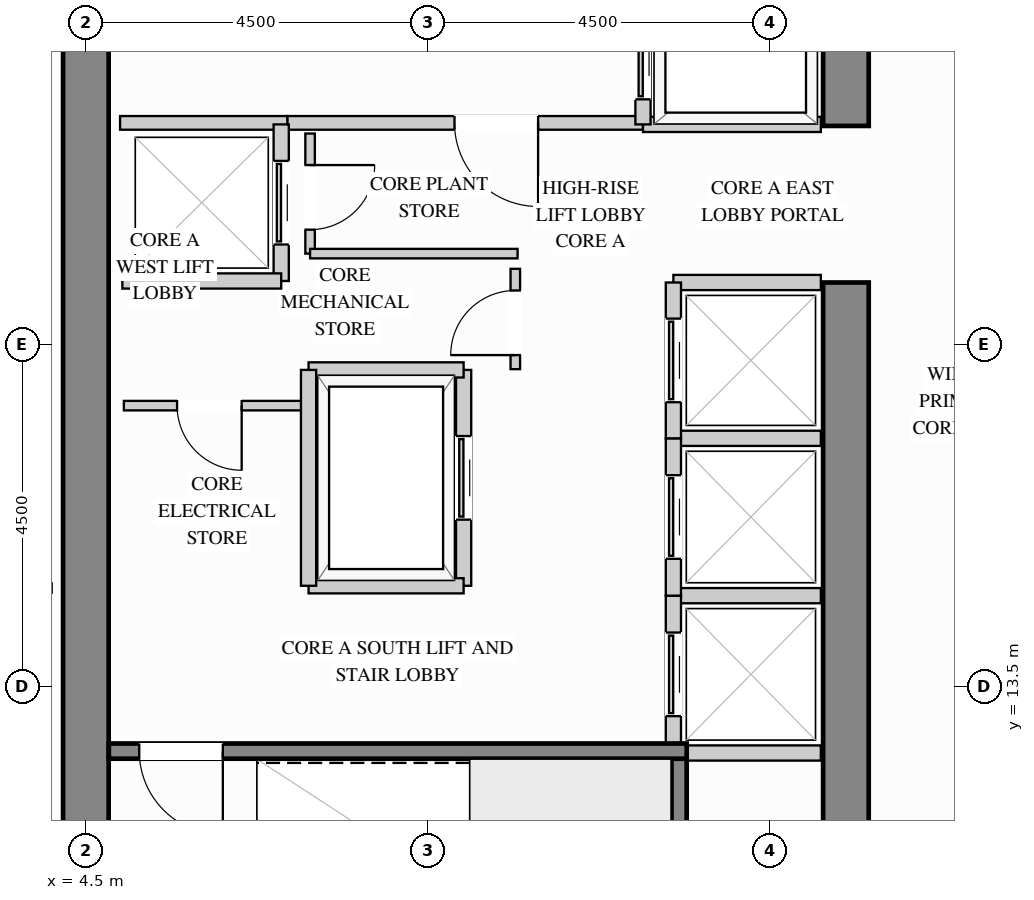
"""IFC4 building model, lengths in metres.
Left out: names, types, materials, properties, quantities, classifications, styles, units other than length and angle.
Written with IfcOpenShell. Run it as: python <this file> out.ifc"""

import sys

from ifc_helpers import new_model, si_unit, direction, frame, frame_2d, origin, place, context, subcontext, project, spatial, rectangle, extrude, source, transform, mapped, element, fill, save


model = new_model("IFC4")
c1 = context("Model", 3, precision=1e-05, world=origin(), true_north=direction((0.0, 1.0)))
c2 = subcontext(c1, "Body", "Model", "MODEL_VIEW")
j1 = project(units=[si_unit("LENGTHUNIT", "METRE"), si_unit("PLANEANGLEUNIT", "RADIAN")], contexts=[c1])
p1 = place(None, origin())
s1 = spatial("IfcSite", under=j1, at=p1, CompositionType="ELEMENT")
p2 = place(p1, origin())
s2 = spatial("IfcBuilding", under=s1, at=p2, CompositionType="ELEMENT")
p3 = place(p2, frame((0.0, 0.0, 175.5)))
s3 = spatial("IfcBuildingStorey", under=s2, at=p3, CompositionType="ELEMENT", Elevation=175.5)
m1 = source(origin(), c2, "Body", "SweptSolid", [
    extrude(rectangle(XDim=10.02, YDim=0.6, at=frame_2d((5.01, 0.0))), origin(), (0.0, 0.0, 1.0), 3.4),
])
p4 = place(p3, frame((14.5, 8.8, 0.0), z_axis=(0.0, 0.0, 1.0), x_axis=(0.0, 1.0, 0.0)))
e1 = element("IfcWall", 1, at=p4, inside=s3, PredefinedType="SHEAR", context=c2, shape_type="MappedRepresentation", body=[
    mapped(m1, transform((0.0, 0.0, 0.0), x_axis=(1.0, 0.0, 0.0), y_axis=(0.0, 1.0, 0.0), z_axis=(0.0, 0.0, 1.0))),
])
m2 = source(origin(), c2, "Body", "SweptSolid", [
    extrude(rectangle(XDim=8.32, YDim=0.6, at=frame_2d((4.16, 0.0))), origin(), (0.0, 0.0, 1.0), 3.4),
])
p5 = place(p3, frame((14.5, 20.88, 0.0), z_axis=(0.0, 0.0, 1.0), x_axis=(0.0, 1.0, 0.0)))
e2 = element("IfcWall", 2, at=p5, inside=s3, PredefinedType="SHEAR", context=c2, shape_type="MappedRepresentation", body=[
    mapped(m2, transform((0.0, 0.0, 0.0), x_axis=(1.0, 0.0, 0.0), y_axis=(0.0, 1.0, 0.0), z_axis=(0.0, 0.0, 1.0))),
])
m3 = source(origin(), c2, "Body", "SweptSolid", [
    extrude(rectangle(XDim=20.4, YDim=0.6, at=frame_2d((10.2, 0.0))), origin(), (0.0, 0.0, 1.0), 3.4),
])
p6 = place(p3, frame((4.5, 8.8, 0.0), z_axis=(0.0, 0.0, 1.0), x_axis=(0.0, 1.0, 0.0)))
e3 = element("IfcWall", 3, at=p6, inside=s3, PredefinedType="SHEAR", context=c2, shape_type="MappedRepresentation", body=[
    mapped(m3, transform((0.0, 0.0, 0.0), x_axis=(1.0, 0.0, 0.0), y_axis=(0.0, 1.0, 0.0), z_axis=(0.0, 0.0, 1.0))),
])
p7 = place(p3, frame((7.15, 20.92, 0.0), z_axis=(0.0, 0.0, 1.0), x_axis=(1.0, 0.0, 0.0)))
e4 = element("IfcWall", 4, at=p7, inside=s3, PredefinedType="PARTITIONING", context=c2, shape_type="SweptSolid", body=[
    extrude(rectangle(XDim=4.68, YDim=0.18, at=frame_2d((2.34, 0.0))), origin(), (0.0, 0.0, 1.0), 3.385),
])
p8 = place(p7, frame((2.2, 0.0, 0.0)))
e5 = element("IfcOpeningElement", 5, at=p8, cuts=e4, PredefinedType="OPENING", context=c2, shape_type="SweptSolid", body=[
    extrude(rectangle(XDim=1.1, YDim=2.15, at=frame_2d((0.55, 1.075))), frame((0.0, 0.1, 0.0), z_axis=(0.0, -1.0, 0.0), x_axis=(1.0, 0.0, 0.0)), (0.0, 0.0, 1.0), 0.2),
])
m4 = source(origin(), c2, "Body", "SweptSolid", [
    extrude(rectangle(XDim=2.2, YDim=0.18, at=frame_2d((1.1, 0.0))), origin(), (0.0, 0.0, 1.0), 3.385),
])
p9 = place(p3, frame((4.95, 20.92, 0.0), z_axis=(0.0, 0.0, 1.0), x_axis=(1.0, 0.0, 0.0)))
e6 = element("IfcWall", 6, at=p9, inside=s3, PredefinedType="PARTITIONING", context=c2, shape_type="MappedRepresentation", body=[
    mapped(m4, transform((0.0, 0.0, 0.0), x_axis=(1.0, 0.0, 0.0), y_axis=(0.0, 1.0, 0.0), z_axis=(0.0, 0.0, 1.0))),
])
p10 = place(p3, frame((10.15, 17.68, 0.0), z_axis=(0.0, 0.0, 1.0), x_axis=(0.0, 1.0, 0.0)))
e7 = element("IfcWall", 7, at=p10, inside=s3, PredefinedType="PARTITIONING", context=c2, shape_type="SweptSolid", body=[
    extrude(rectangle(XDim=1.32, YDim=0.125, at=frame_2d((0.66, 0.0))), origin(), (0.0, 0.0, 1.0), 3.385),
])
p11 = place(p10, frame((0.185, 0.0, 0.0)))
e8 = element("IfcOpeningElement", 8, at=p11, cuts=e7, PredefinedType="OPENING", context=c2, shape_type="SweptSolid", body=[
    extrude(rectangle(XDim=0.85, YDim=2.1, at=frame_2d((0.425, 1.05))), frame((0.0, 0.073, 0.0), z_axis=(0.0, -1.0, 0.0), x_axis=(1.0, 0.0, 0.0)), (0.0, 0.0, 1.0), 0.145),
])
p12 = place(p3, frame((7.45, 19.2, 0.0), z_axis=(0.0, 0.0, 1.0), x_axis=(0.0, 1.0, 0.0)))
e9 = element("IfcWall", 9, at=p12, inside=s3, PredefinedType="PARTITIONING", context=c2, shape_type="SweptSolid", body=[
    extrude(rectangle(XDim=1.58, YDim=0.125, at=frame_2d((0.79, 0.0))), origin(), (0.0, 0.0, 1.0), 3.385),
])
p13 = place(p12, frame((0.315, 0.0, 0.0)))
e10 = element("IfcOpeningElement", 10, at=p13, cuts=e9, PredefinedType="OPENING", context=c2, shape_type="SweptSolid", body=[
    extrude(rectangle(XDim=0.85, YDim=2.1, at=frame_2d((0.425, 1.05))), frame((0.0, 0.073, 0.0), z_axis=(0.0, -1.0, 0.0), x_axis=(1.0, 0.0, 0.0)), (0.0, 0.0, 1.0), 0.145),
])
m5 = source(origin(), c2, "Body", "SweptSolid", [
    extrude(rectangle(XDim=2.73, YDim=0.125, at=frame_2d((1.365, 0.0))), origin(), (0.0, 0.0, 1.0), 3.385),
])
p14 = place(p3, frame((7.45, 19.2, 0.0), z_axis=(0.0, 0.0, 1.0), x_axis=(1.0, 0.0, 0.0)))
e11 = element("IfcWall", 11, at=p14, inside=s3, PredefinedType="PARTITIONING", context=c2, shape_type="MappedRepresentation", body=[
    mapped(m5, transform((0.0, 0.0, 0.0), x_axis=(1.0, 0.0, 0.0), y_axis=(0.0, 1.0, 0.0), z_axis=(0.0, 0.0, 1.0))),
])
p15 = place(p3, frame((5.0, 17.2, 0.0), z_axis=(0.0, 0.0, 1.0), x_axis=(1.0, 0.0, 0.0)))
e12 = element("IfcWall", 12, at=p15, inside=s3, PredefinedType="PARTITIONING", context=c2, shape_type="SweptSolid", body=[
    extrude(rectangle(XDim=2.4, YDim=0.125, at=frame_2d((1.2, 0.0))), origin(), (0.0, 0.0, 1.0), 3.385),
])
p16 = place(p15, frame((0.7, 0.0, 0.0)))
e13 = element("IfcOpeningElement", 13, at=p16, cuts=e12, PredefinedType="OPENING", context=c2, shape_type="SweptSolid", body=[
    extrude(rectangle(XDim=0.85, YDim=2.1, at=frame_2d((0.425, 1.05))), frame((0.0, 0.073, 0.0), z_axis=(0.0, -1.0, 0.0), x_axis=(1.0, 0.0, 0.0)), (0.0, 0.0, 1.0), 0.145),
])
m6 = source(origin(), c2, "Body", "SweptSolid", [
    extrude(rectangle(XDim=3.698, YDim=0.125, at=frame_2d((1.849, 0.0))), origin(), (0.0, 0.0, 1.0), 3.385),
])
p17 = place(p3, frame((0.352, 14.8, 0.0), z_axis=(0.0, 0.0, 1.0), x_axis=(1.0, 0.0, 0.0)))
e14 = element("IfcWall", 14, at=p17, inside=s3, PredefinedType="PARTITIONING", context=c2, shape_type="MappedRepresentation", body=[
    mapped(m6, transform((0.0, 0.0, 0.0), x_axis=(1.0, 0.0, 0.0), y_axis=(0.0, 1.0, 0.0), z_axis=(0.0, 0.0, 1.0))),
])
m7 = source(origin(), c2, "Body", "SweptSolid", [
    extrude(rectangle(XDim=2.34, YDim=0.2, at=frame_2d((1.17, 0.0))), origin(), (0.0, 0.0, 1.0), 3.385),
])
p18 = place(p3, frame((11.83, 20.9, 0.0), z_axis=(0.0, 0.0, 1.0), x_axis=(1.0, 0.0, 0.0)))
e15 = element("IfcWall", 15, at=p18, inside=s3, PredefinedType="PARTITIONING", context=c2, shape_type="MappedRepresentation", body=[
    mapped(m7, transform((0.0, 0.0, 0.0), x_axis=(1.0, 0.0, 0.0), y_axis=(0.0, 1.0, 0.0), z_axis=(0.0, 0.0, 1.0))),
])
p19 = place(p3, frame((11.83, 20.9, 0.0), z_axis=(0.0, 0.0, 1.0), x_axis=(0.0, 1.0, 0.0)))
e16 = element("IfcWall", 16, at=p19, inside=s3, PredefinedType="PARTITIONING", context=c2, shape_type="SweptSolid", body=[
    extrude(rectangle(XDim=1.76, YDim=0.2, at=frame_2d((0.88, 0.0))), origin(), (0.0, 0.0, 1.0), 3.385),
])
p20 = place(p19, frame((0.33, 0.0, 0.0)))
e17 = element("IfcOpeningElement", 17, at=p20, cuts=e16, PredefinedType="OPENING", context=c2, shape_type="SweptSolid", body=[
    extrude(rectangle(XDim=1.1, YDim=2.2, at=frame_2d((0.55, 1.1))), frame((0.0, 0.11, 0.0), z_axis=(0.0, -1.0, 0.0), x_axis=(1.0, 0.0, 0.0)), (0.0, 0.0, 1.0), 0.22),
])
m8 = source(origin(), c2, "Body", "SweptSolid", [
    extrude(rectangle(XDim=1.94, YDim=0.2, at=frame_2d((0.97, 0.0))), origin(), (0.0, 0.0, 1.0), 3.385),
])
for number, where, z_axis, x_axis in (
    (18, (12.23, 14.7, 0.0), (0.0, 0.0, 1.0), (1.0, 0.0, 0.0)),
    (19, (12.23, 12.63, 0.0), (0.0, 0.0, 1.0), (1.0, 0.0, 0.0)),
):
    element("IfcWall", number, at=place(p3, frame(where, z_axis=z_axis, x_axis=x_axis)), inside=s3, PredefinedType="PARTITIONING", context=c2, shape_type="MappedRepresentation", body=[
        mapped(m8, transform((0.0, 0.0, 0.0), x_axis=(1.0, 0.0, 0.0), y_axis=(0.0, 1.0, 0.0), z_axis=(0.0, 0.0, 1.0))),
    ])
p21 = place(p3, frame((12.23, 12.63, 0.0), z_axis=(0.0, 0.0, 1.0), x_axis=(0.0, 1.0, 0.0)))
e20 = element("IfcWall", 20, at=p21, inside=s3, PredefinedType="PARTITIONING", context=c2, shape_type="SweptSolid", body=[
    extrude(rectangle(XDim=2.07, YDim=0.2, at=frame_2d((1.035, 0.0))), origin(), (0.0, 0.0, 1.0), 3.385),
])
p22 = place(p21, frame((0.485, 0.0, 0.0)))
e21 = element("IfcOpeningElement", 21, at=p22, cuts=e20, PredefinedType="OPENING", context=c2, shape_type="SweptSolid", body=[
    extrude(rectangle(XDim=1.1, YDim=2.2, at=frame_2d((0.55, 1.1))), frame((0.0, 0.11, 0.0), z_axis=(0.0, -1.0, 0.0), x_axis=(1.0, 0.0, 0.0)), (0.0, 0.0, 1.0), 0.22),
])
p23 = place(p3, frame((12.23, 16.77, 0.0), z_axis=(0.0, 0.0, 1.0), x_axis=(1.0, 0.0, 0.0)))
e22 = element("IfcWall", 22, at=p23, inside=s3, PredefinedType="PARTITIONING", context=c2, shape_type="MappedRepresentation", body=[
    mapped(m8, transform((0.0, 0.0, 0.0), x_axis=(1.0, 0.0, 0.0), y_axis=(0.0, 1.0, 0.0), z_axis=(0.0, 0.0, 1.0))),
])
p24 = place(p3, frame((12.23, 14.7, 0.0), z_axis=(0.0, 0.0, 1.0), x_axis=(0.0, 1.0, 0.0)))
e23 = element("IfcWall", 23, at=p24, inside=s3, PredefinedType="PARTITIONING", context=c2, shape_type="SweptSolid", body=[
    extrude(rectangle(XDim=2.07, YDim=0.2, at=frame_2d((1.035, 0.0))), origin(), (0.0, 0.0, 1.0), 3.385),
])
p25 = place(p24, frame((0.485, 0.0, 0.0)))
e24 = element("IfcOpeningElement", 24, at=p25, cuts=e23, PredefinedType="OPENING", context=c2, shape_type="SweptSolid", body=[
    extrude(rectangle(XDim=1.1, YDim=2.2, at=frame_2d((0.55, 1.1))), frame((0.0, 0.11, 0.0), z_axis=(0.0, -1.0, 0.0), x_axis=(1.0, 0.0, 0.0)), (0.0, 0.0, 1.0), 0.22),
])
p26 = place(p3, frame((12.23, 18.82, 0.0), z_axis=(0.0, 0.0, 1.0), x_axis=(1.0, 0.0, 0.0)))
e25 = element("IfcWall", 25, at=p26, inside=s3, PredefinedType="PARTITIONING", context=c2, shape_type="MappedRepresentation", body=[
    mapped(m8, transform((0.0, 0.0, 0.0), x_axis=(1.0, 0.0, 0.0), y_axis=(0.0, 1.0, 0.0), z_axis=(0.0, 0.0, 1.0))),
])
p27 = place(p3, frame((12.23, 16.77, 0.0), z_axis=(0.0, 0.0, 1.0), x_axis=(0.0, 1.0, 0.0)))
e26 = element("IfcWall", 26, at=p27, inside=s3, PredefinedType="PARTITIONING", context=c2, shape_type="SweptSolid", body=[
    extrude(rectangle(XDim=2.05, YDim=0.2, at=frame_2d((1.025, 0.0))), origin(), (0.0, 0.0, 1.0), 3.385),
])
p28 = place(p27, frame((0.475, 0.0, 0.0)))
e27 = element("IfcOpeningElement", 27, at=p28, cuts=e26, PredefinedType="OPENING", context=c2, shape_type="SweptSolid", body=[
    extrude(rectangle(XDim=1.1, YDim=2.2, at=frame_2d((0.55, 1.1))), frame((0.0, 0.11, 0.0), z_axis=(0.0, -1.0, 0.0), x_axis=(1.0, 0.0, 0.0)), (0.0, 0.0, 1.0), 0.22),
])
p29 = place(p3, frame((7.07, 18.84, 0.0), z_axis=(0.0, 0.0, 1.0), x_axis=(0.0, 1.0, 0.0)))
e28 = element("IfcWall", 28, at=p29, inside=s3, PredefinedType="PARTITIONING", context=c2, shape_type="SweptSolid", body=[
    extrude(rectangle(XDim=2.06, YDim=0.2, at=frame_2d((1.03, 0.0))), origin(), (0.0, 0.0, 1.0), 3.385),
])
p30 = place(p29, frame((0.48, 0.0, 0.0)))
e29 = element("IfcOpeningElement", 29, at=p30, cuts=e28, PredefinedType="OPENING", context=c2, shape_type="SweptSolid", body=[
    extrude(rectangle(XDim=1.1, YDim=2.2, at=frame_2d((0.55, 1.1))), frame((0.0, 0.11, 0.0), z_axis=(0.0, -1.0, 0.0), x_axis=(1.0, 0.0, 0.0)), (0.0, 0.0, 1.0), 0.22),
])
m9 = source(origin(), c2, "Body", "SweptSolid", [
    extrude(rectangle(XDim=2.09, YDim=0.2, at=frame_2d((1.045, 0.0))), origin(), (0.0, 0.0, 1.0), 3.385),
])
p31 = place(p3, frame((4.98, 18.84, 0.0), z_axis=(0.0, 0.0, 1.0), x_axis=(1.0, 0.0, 0.0)))
e30 = element("IfcWall", 30, at=p31, inside=s3, PredefinedType="PARTITIONING", context=c2, shape_type="MappedRepresentation", body=[
    mapped(m9, transform((0.0, 0.0, 0.0), x_axis=(1.0, 0.0, 0.0), y_axis=(0.0, 1.0, 0.0), z_axis=(0.0, 0.0, 1.0))),
])
p32 = place(p3, frame((9.47, 14.83, 0.0), z_axis=(0.0, 0.0, 1.0), x_axis=(0.0, 1.0, 0.0)))
e31 = element("IfcWall", 31, at=p32, inside=s3, PredefinedType="PARTITIONING", context=c2, shape_type="SweptSolid", body=[
    extrude(rectangle(XDim=2.84, YDim=0.2, at=frame_2d((1.42, 0.0))), origin(), (0.0, 0.0, 1.0), 3.385),
])
p33 = place(p32, frame((0.87, 0.0, 0.0)))
e32 = element("IfcOpeningElement", 32, at=p33, cuts=e31, PredefinedType="OPENING", context=c2, shape_type="SweptSolid", body=[
    extrude(rectangle(XDim=1.1, YDim=2.2, at=frame_2d((0.55, 1.1))), frame((0.0, 0.11, 0.0), z_axis=(0.0, -1.0, 0.0), x_axis=(1.0, 0.0, 0.0)), (0.0, 0.0, 1.0), 0.22),
])
m10 = source(origin(), c2, "Body", "SweptSolid", [
    extrude(rectangle(XDim=2.04, YDim=0.2, at=frame_2d((1.02, 0.0))), origin(), (0.0, 0.0, 1.0), 3.385),
])
for number, where, z_axis, x_axis in (
    (33, (7.43, 17.67, 0.0), (0.0, 0.0, 1.0), (1.0, 0.0, 0.0)),
    (34, (7.43, 14.83, 0.0), (0.0, 0.0, 1.0), (1.0, 0.0, 0.0)),
):
    element("IfcWall", number, at=place(p3, frame(where, z_axis=z_axis, x_axis=x_axis)), inside=s3, PredefinedType="PARTITIONING", context=c2, shape_type="MappedRepresentation", body=[
        mapped(m10, transform((0.0, 0.0, 0.0), x_axis=(1.0, 0.0, 0.0), y_axis=(0.0, 1.0, 0.0), z_axis=(0.0, 0.0, 1.0))),
    ])
m11 = source(origin(), c2, "Body", "SweptSolid", [
    extrude(rectangle(XDim=2.84, YDim=0.2, at=frame_2d((1.42, 0.0))), origin(), (0.0, 0.0, 1.0), 3.385),
])
p34 = place(p3, frame((7.43, 14.83, 0.0), z_axis=(0.0, 0.0, 1.0), x_axis=(0.0, 1.0, 0.0)))
e35 = element("IfcWall", 35, at=p34, inside=s3, PredefinedType="PARTITIONING", context=c2, shape_type="MappedRepresentation", body=[
    mapped(m11, transform((0.0, 0.0, 0.0), x_axis=(1.0, 0.0, 0.0), y_axis=(0.0, 1.0, 0.0), z_axis=(0.0, 0.0, 1.0))),
])
m12 = source(origin(), c2, "Body", "SweptSolid", [
    extrude(rectangle(XDim=3.753, YDim=0.2, at=frame_2d((1.876, 0.0))), origin(), (0.0, 0.0, 1.0), 3.4),
])
p35 = place(p3, frame((12.305, 8.802, 0.0), z_axis=(0.0, 0.0, 1.0), x_axis=(0.0, 1.0, 0.0)))
e36 = element("IfcWall", 36, at=p35, inside=s3, PredefinedType="SHEAR", context=c2, shape_type="MappedRepresentation", body=[
    mapped(m12, transform((0.0, 0.0, 0.0), x_axis=(1.0, 0.0, 0.0), y_axis=(0.0, 1.0, 0.0), z_axis=(0.0, 0.0, 1.0))),
])
p36 = place(p3, frame((4.802, 12.655, 0.0), z_axis=(0.0, 0.0, 1.0), x_axis=(1.0, 0.0, 0.0)))
e37 = element("IfcWall", 37, at=p36, inside=s3, PredefinedType="SHEAR", context=c2, shape_type="SweptSolid", body=[
    extrude(rectangle(XDim=7.603, YDim=0.2, at=frame_2d((3.802, 0.0))), origin(), (0.0, 0.0, 1.0), 3.4),
])
p37 = place(p36, frame((0.4, 0.0, 0.0)))
e38 = element("IfcOpeningElement", 38, at=p37, cuts=e37, PredefinedType="OPENING", context=c2, shape_type="SweptSolid", body=[
    extrude(rectangle(XDim=1.1, YDim=2.15, at=frame_2d((0.55, 1.075))), frame((0.0, 0.11, 0.0), z_axis=(0.0, -1.0, 0.0), x_axis=(1.0, 0.0, 0.0)), (0.0, 0.0, 1.0), 0.22),
])
m13 = source(origin(), c2, "Body", "SweptSolid", [
    extrude(rectangle(XDim=1.1, YDim=2.15, at=frame_2d((0.55, 1.075))), frame((0.0, 0.025, 0.0), z_axis=(0.0, -1.0, 0.0), x_axis=(1.0, 0.0, 0.0)), (0.0, 0.0, 1.0), 0.05),
])
p38 = place(p8, origin())
e39 = element("IfcDoor", 39, at=p38, inside=s3, OperationType="SINGLE_SWING_RIGHT", PredefinedType="DOOR", context=c2, shape_type="MappedRepresentation", body=[
    mapped(m13, transform((0.0, 0.0, 0.0), x_axis=(1.0, 0.0, 0.0), y_axis=(0.0, 1.0, 0.0), z_axis=(0.0, 0.0, 1.0))),
])
fill(e5, e39)
m14 = source(origin(), c2, "Body", "SweptSolid", [
    extrude(rectangle(XDim=1.1, YDim=2.2, at=frame_2d((0.55, 1.1))), frame((0.0, 0.025, 0.0), z_axis=(0.0, -1.0, 0.0), x_axis=(1.0, 0.0, 0.0)), (0.0, 0.0, 1.0), 0.05),
])
p39 = place(p20, origin())
e40 = element("IfcDoor", 40, at=p39, inside=s3, OperationType="SLIDING_TO_LEFT", PredefinedType="DOOR", context=c2, shape_type="MappedRepresentation", body=[
    mapped(m14, transform((0.0, 0.0, 0.0), x_axis=(1.0, 0.0, 0.0), y_axis=(0.0, 1.0, 0.0), z_axis=(0.0, 0.0, 1.0))),
])
fill(e17, e40)
p40 = place(p22, origin())
e41 = element("IfcDoor", 41, at=p40, inside=s3, OperationType="SLIDING_TO_LEFT", PredefinedType="DOOR", context=c2, shape_type="MappedRepresentation", body=[
    mapped(m14, transform((0.0, 0.0, 0.0), x_axis=(1.0, 0.0, 0.0), y_axis=(0.0, 1.0, 0.0), z_axis=(0.0, 0.0, 1.0))),
])
fill(e21, e41)
p41 = place(p25, origin())
e42 = element("IfcDoor", 42, at=p41, inside=s3, OperationType="SLIDING_TO_LEFT", PredefinedType="DOOR", context=c2, shape_type="MappedRepresentation", body=[
    mapped(m14, transform((0.0, 0.0, 0.0), x_axis=(1.0, 0.0, 0.0), y_axis=(0.0, 1.0, 0.0), z_axis=(0.0, 0.0, 1.0))),
])
fill(e24, e42)
p42 = place(p28, origin())
e43 = element("IfcDoor", 43, at=p42, inside=s3, OperationType="SLIDING_TO_LEFT", PredefinedType="DOOR", context=c2, shape_type="MappedRepresentation", body=[
    mapped(m14, transform((0.0, 0.0, 0.0), x_axis=(1.0, 0.0, 0.0), y_axis=(0.0, 1.0, 0.0), z_axis=(0.0, 0.0, 1.0))),
])
fill(e27, e43)
p43 = place(p30, origin())
e44 = element("IfcDoor", 44, at=p43, inside=s3, OperationType="SLIDING_TO_LEFT", PredefinedType="DOOR", context=c2, shape_type="MappedRepresentation", body=[
    mapped(m14, transform((0.0, 0.0, 0.0), x_axis=(1.0, 0.0, 0.0), y_axis=(0.0, 1.0, 0.0), z_axis=(0.0, 0.0, 1.0))),
])
fill(e29, e44)
p44 = place(p33, origin())
e45 = element("IfcDoor", 45, at=p44, inside=s3, OperationType="SLIDING_TO_LEFT", PredefinedType="DOOR", context=c2, shape_type="MappedRepresentation", body=[
    mapped(m14, transform((0.0, 0.0, 0.0), x_axis=(1.0, 0.0, 0.0), y_axis=(0.0, 1.0, 0.0), z_axis=(0.0, 0.0, 1.0))),
])
fill(e32, e45)
m15 = source(origin(), c2, "Body", "SweptSolid", [
    extrude(rectangle(XDim=0.85, YDim=2.1, at=frame_2d((0.425, 1.05))), frame((0.0, 0.025, 0.0), z_axis=(0.0, -1.0, 0.0), x_axis=(1.0, 0.0, 0.0)), (0.0, 0.0, 1.0), 0.05),
])
p45 = place(p11, origin())
e46 = element("IfcDoor", 46, at=p45, inside=s3, OperationType="SINGLE_SWING_LEFT", PredefinedType="DOOR", context=c2, shape_type="MappedRepresentation", body=[
    mapped(m15, transform((0.0, 0.0, 0.0), x_axis=(1.0, 0.0, 0.0), y_axis=(0.0, 1.0, 0.0), z_axis=(0.0, 0.0, 1.0))),
])
fill(e8, e46)
p46 = place(p16, origin())
e47 = element("IfcDoor", 47, at=p46, inside=s3, OperationType="SINGLE_SWING_RIGHT", PredefinedType="DOOR", context=c2, shape_type="MappedRepresentation", body=[
    mapped(m15, transform((0.0, 0.0, 0.0), x_axis=(1.0, 0.0, 0.0), y_axis=(0.0, 1.0, 0.0), z_axis=(0.0, 0.0, 1.0))),
])
fill(e13, e47)
p47 = place(p13, origin())
e48 = element("IfcDoor", 48, at=p47, inside=s3, OperationType="SINGLE_SWING_RIGHT", PredefinedType="DOOR", context=c2, shape_type="MappedRepresentation", body=[
    mapped(m15, transform((0.0, 0.0, 0.0), x_axis=(1.0, 0.0, 0.0), y_axis=(0.0, 1.0, 0.0), z_axis=(0.0, 0.0, 1.0))),
])
fill(e10, e48)
m16 = source(origin(), c2, "Body", "SweptSolid", [
    extrude(rectangle(XDim=1.1, YDim=2.15, at=frame_2d((0.55, 1.075))), frame((0.0, 0.025, 0.0), z_axis=(0.0, -1.0, 0.0), x_axis=(1.0, 0.0, 0.0)), (0.0, 0.0, 1.0), 0.05),
])
p48 = place(p37, origin())
e49 = element("IfcDoor", 49, at=p48, inside=s3, OperationType="SINGLE_SWING_RIGHT", PredefinedType="DOOR", context=c2, shape_type="MappedRepresentation", body=[
    mapped(m16, transform((0.0, 0.0, 0.0), x_axis=(1.0, 0.0, 0.0), y_axis=(0.0, 1.0, 0.0), z_axis=(0.0, 0.0, 1.0))),
])
fill(e38, e49)
save(model, sys.argv[1])
